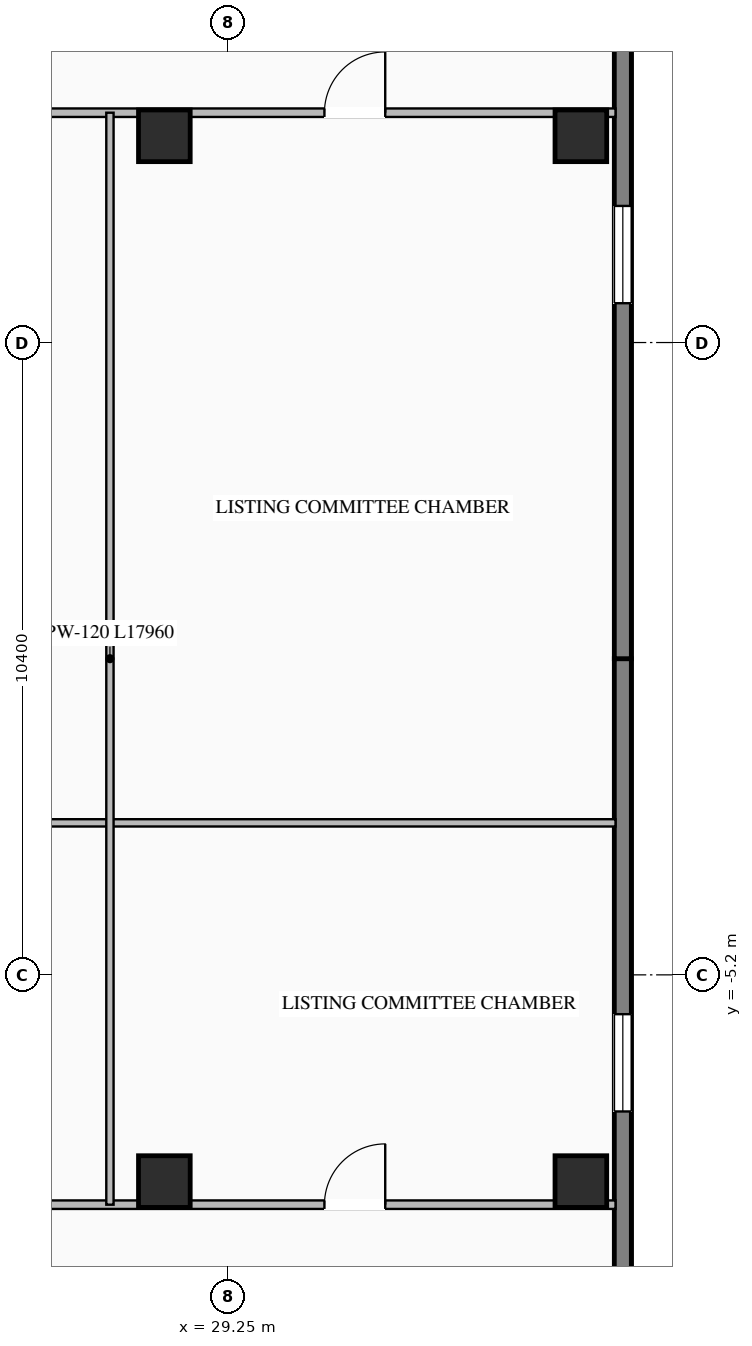
"""IFC4 building model, lengths in metres.
Left out: names, types, materials, properties, quantities, classifications, styles, units other than length and angle.
Written with IfcOpenShell. Run it as: python <this file> out.ifc"""

import sys

from ifc_helpers import new_model, si_unit, direction, frame, frame_2d, origin, origin_2d, place, context, subcontext, project, spatial, rectangle, i_section, extrude, element, fill, save


model = new_model("IFC4")
c1 = context("Model", 3, precision=1e-05, world=origin(), true_north=direction((0.0, 1.0)))
c2 = subcontext(c1, "Body", "Model", "MODEL_VIEW")
j1 = project(units=[si_unit("LENGTHUNIT", "METRE"), si_unit("PLANEANGLEUNIT", "RADIAN")], contexts=[c1])
p1 = place(None, origin())
s1 = spatial("IfcSite", under=j1, at=p1, CompositionType="ELEMENT")
p2 = place(p1, origin())
s2 = spatial("IfcBuilding", under=s1, at=p2, CompositionType="ELEMENT")
p3 = place(p2, frame((0.0, 0.0, 31.2)))
s3 = spatial("IfcBuildingStorey", under=s2, at=p3, CompositionType="ELEMENT", Elevation=31.2)
for number, where, z_axis, x_axis in (
    (1, (28.2, -8.6, 0.0), (0.0, 0.0, 1.0), (1.0, 0.0, 0.0)),
    (2, (28.2, 8.6, 0.0), (0.0, 0.0, 1.0), (1.0, 0.0, 0.0)),
    (3, (35.05, -8.6, 0.0), (0.0, 0.0, 1.0), (1.0, 0.0, 0.0)),
    (4, (35.05, 8.6, 0.0), (0.0, 0.0, 1.0), (1.0, 0.0, 0.0)),
):
    element("IfcColumn", number, at=place(p3, frame(where, z_axis=z_axis, x_axis=x_axis)), inside=s3, PredefinedType="COLUMN", context=c2, shape_type="SweptSolid", body=[
        extrude(i_section(OverallWidth=0.85, OverallDepth=0.85, WebThickness=0.032, FlangeThickness=0.048, at=origin_2d()), origin(), (0.0, 0.0, 1.0), 3.45),
    ])
p4 = place(p3, frame((35.74, 0.0, 0.0), z_axis=(0.0, 0.0, 1.0), x_axis=(0.0, -1.0, 0.0)))
e5 = element("IfcWall", 5, at=p4, inside=s3, PredefinedType="STANDARD", context=c2, shape_type="SweptSolid", body=[
    extrude(rectangle(XDim=19.94, YDim=0.28, at=frame_2d((9.97, 0.0))), origin(), (0.0, 0.0, 1.0), 3.25),
])
p5 = place(p4, frame((5.847, 0.0, 0.76)))
e6 = element("IfcOpeningElement", 6, at=p5, cuts=e5, PredefinedType="OPENING", context=c2, shape_type="SweptSolid", body=[
    extrude(rectangle(XDim=1.6, YDim=1.95, at=frame_2d((0.8, 0.975))), frame((0.0, 0.15, 0.0), z_axis=(0.0, -1.0, 0.0), x_axis=(1.0, 0.0, 0.0)), (0.0, 0.0, 1.0), 0.3),
])
p6 = place(p4, frame((11.943, 0.0, 0.76)))
e7 = element("IfcOpeningElement", 7, at=p6, cuts=e5, PredefinedType="OPENING", context=c2, shape_type="SweptSolid", body=[
    extrude(rectangle(XDim=1.6, YDim=1.95, at=frame_2d((0.8, 0.975))), frame((0.0, 0.15, 0.0), z_axis=(0.0, -1.0, 0.0), x_axis=(1.0, 0.0, 0.0)), (0.0, 0.0, 1.0), 0.3),
])
p7 = place(p3, frame((35.74, 19.94, 0.0), z_axis=(0.0, 0.0, 1.0), x_axis=(0.0, -1.0, 0.0)))
e8 = element("IfcWall", 8, at=p7, inside=s3, PredefinedType="STANDARD", context=c2, shape_type="SweptSolid", body=[
    extrude(rectangle(XDim=19.94, YDim=0.28, at=frame_2d((9.97, 0.0))), origin(), (0.0, 0.0, 1.0), 3.25),
])
p8 = place(p7, frame((6.397, 0.0, 0.76)))
e9 = element("IfcOpeningElement", 9, at=p8, cuts=e8, PredefinedType="OPENING", context=c2, shape_type="SweptSolid", body=[
    extrude(rectangle(XDim=1.6, YDim=1.95, at=frame_2d((0.8, 0.975))), frame((0.0, 0.15, 0.0), z_axis=(0.0, -1.0, 0.0), x_axis=(1.0, 0.0, 0.0)), (0.0, 0.0, 1.0), 0.3),
])
p9 = place(p7, frame((12.493, 0.0, 0.76)))
e10 = element("IfcOpeningElement", 10, at=p9, cuts=e8, PredefinedType="OPENING", context=c2, shape_type="SweptSolid", body=[
    extrude(rectangle(XDim=1.6, YDim=1.95, at=frame_2d((0.8, 0.975))), frame((0.0, 0.15, 0.0), z_axis=(0.0, -1.0, 0.0), x_axis=(1.0, 0.0, 0.0)), (0.0, 0.0, 1.0), 0.3),
])
p10 = place(p3, frame((19.05, 8.98, 0.0), z_axis=(0.0, 0.0, 1.0), x_axis=(1.0, 0.0, 0.0)))
e11 = element("IfcWall", 11, at=p10, inside=s3, PredefinedType="STANDARD", context=c2, shape_type="SweptSolid", body=[
    extrude(rectangle(XDim=16.57, YDim=0.14, at=frame_2d((8.285, 0.0))), origin(), (0.0, 0.0, 1.0), 3.25),
])
p11 = place(p10, frame((0.535, 0.0, 0.0)))
e12 = element("IfcOpeningElement", 12, at=p11, cuts=e11, PredefinedType="OPENING", context=c2, shape_type="SweptSolid", body=[
    extrude(rectangle(XDim=1.0, YDim=2.08, at=frame_2d((0.5, 1.04))), frame((0.0, 0.08, 0.0), z_axis=(0.0, -1.0, 0.0), x_axis=(1.0, 0.0, 0.0)), (0.0, 0.0, 1.0), 0.16),
])
p12 = place(p10, frame((11.782, 0.0, 0.0)))
e13 = element("IfcOpeningElement", 13, at=p12, cuts=e11, PredefinedType="OPENING", context=c2, shape_type="SweptSolid", body=[
    extrude(rectangle(XDim=1.0, YDim=2.08, at=frame_2d((0.5, 1.04))), frame((0.0, 0.08, 0.0), z_axis=(0.0, -1.0, 0.0), x_axis=(1.0, 0.0, 0.0)), (0.0, 0.0, 1.0), 0.16),
])
p13 = place(p3, frame((19.05, -8.98, 0.0), z_axis=(0.0, 0.0, 1.0), x_axis=(1.0, 0.0, 0.0)))
e14 = element("IfcWall", 14, at=p13, inside=s3, PredefinedType="STANDARD", context=c2, shape_type="SweptSolid", body=[
    extrude(rectangle(XDim=16.57, YDim=0.14, at=frame_2d((8.285, 0.0))), origin(), (0.0, 0.0, 1.0), 3.25),
])
p14 = place(p13, frame((0.535, 0.0, 0.0)))
e15 = element("IfcOpeningElement", 15, at=p14, cuts=e14, PredefinedType="OPENING", context=c2, shape_type="SweptSolid", body=[
    extrude(rectangle(XDim=1.0, YDim=2.08, at=frame_2d((0.5, 1.04))), frame((0.0, 0.08, 0.0), z_axis=(0.0, -1.0, 0.0), x_axis=(1.0, 0.0, 0.0)), (0.0, 0.0, 1.0), 0.16),
])
p15 = place(p13, frame((11.782, 0.0, 0.0)))
e16 = element("IfcOpeningElement", 16, at=p15, cuts=e14, PredefinedType="OPENING", context=c2, shape_type="SweptSolid", body=[
    extrude(rectangle(XDim=1.0, YDim=2.08, at=frame_2d((0.5, 1.04))), frame((0.0, 0.08, 0.0), z_axis=(0.0, -1.0, 0.0), x_axis=(1.0, 0.0, 0.0)), (0.0, 0.0, 1.0), 0.16),
])
p16 = place(p3, frame((19.05, -2.7, 0.0), z_axis=(0.0, 0.0, 1.0), x_axis=(1.0, 0.0, 0.0)))
e17 = element("IfcWall", 17, at=p16, inside=s3, PredefinedType="STANDARD", context=c2, shape_type="SweptSolid", body=[
    extrude(rectangle(XDim=16.57, YDim=0.12, at=frame_2d((8.285, 0.0))), origin(), (0.0, 0.0, 1.0), 3.25),
])
p17 = place(p3, frame((27.305, -8.98, 0.0), z_axis=(0.0, 0.0, 1.0), x_axis=(0.0, 1.0, 0.0)))
e18 = element("IfcWall", 18, at=p17, inside=s3, PredefinedType="STANDARD", context=c2, shape_type="SweptSolid", body=[
    extrude(rectangle(XDim=17.96, YDim=0.12, at=frame_2d((8.98, 0.0))), origin(), (0.0, 0.0, 1.0), 3.25),
])
p18 = place(p5, origin())
e19 = element("IfcWindow", 19, at=p18, inside=s3, PartitioningType="SINGLE_PANEL", PredefinedType="WINDOW", context=c2, shape_type="SweptSolid", body=[
    extrude(rectangle(XDim=1.6, YDim=1.95, at=frame_2d((0.8, 0.975))), frame((0.0, 0.03, 0.0), z_axis=(0.0, -1.0, 0.0), x_axis=(1.0, 0.0, 0.0)), (0.0, 0.0, 1.0), 0.06),
])
fill(e6, e19)
p19 = place(p9, origin())
e20 = element("IfcWindow", 20, at=p19, inside=s3, PartitioningType="SINGLE_PANEL", PredefinedType="WINDOW", context=c2, shape_type="SweptSolid", body=[
    extrude(rectangle(XDim=1.6, YDim=1.95, at=frame_2d((0.8, 0.975))), frame((0.0, 0.03, 0.0), z_axis=(0.0, -1.0, 0.0), x_axis=(1.0, 0.0, 0.0)), (0.0, 0.0, 1.0), 0.06),
])
fill(e10, e20)
p20 = place(p12, origin())
e21 = element("IfcDoor", 21, at=p20, inside=s3, OperationType="SINGLE_SWING_RIGHT", PredefinedType="DOOR", context=c2, shape_type="SweptSolid", body=[
    extrude(rectangle(XDim=1.0, YDim=2.08, at=frame_2d((0.5, 1.04))), frame((0.0, 0.025, 0.0), z_axis=(0.0, -1.0, 0.0), x_axis=(1.0, 0.0, 0.0)), (0.0, 0.0, 1.0), 0.05),
])
fill(e13, e21)
p21 = place(p15, origin())
e22 = element("IfcDoor", 22, at=p21, inside=s3, OperationType="SINGLE_SWING_RIGHT", PredefinedType="DOOR", context=c2, shape_type="SweptSolid", body=[
    extrude(rectangle(XDim=1.0, YDim=2.08, at=frame_2d((0.5, 1.04))), frame((0.0, 0.025, 0.0), z_axis=(0.0, -1.0, 0.0), x_axis=(1.0, 0.0, 0.0)), (0.0, 0.0, 1.0), 0.05),
])
fill(e16, e22)
save(model, sys.argv[1])
